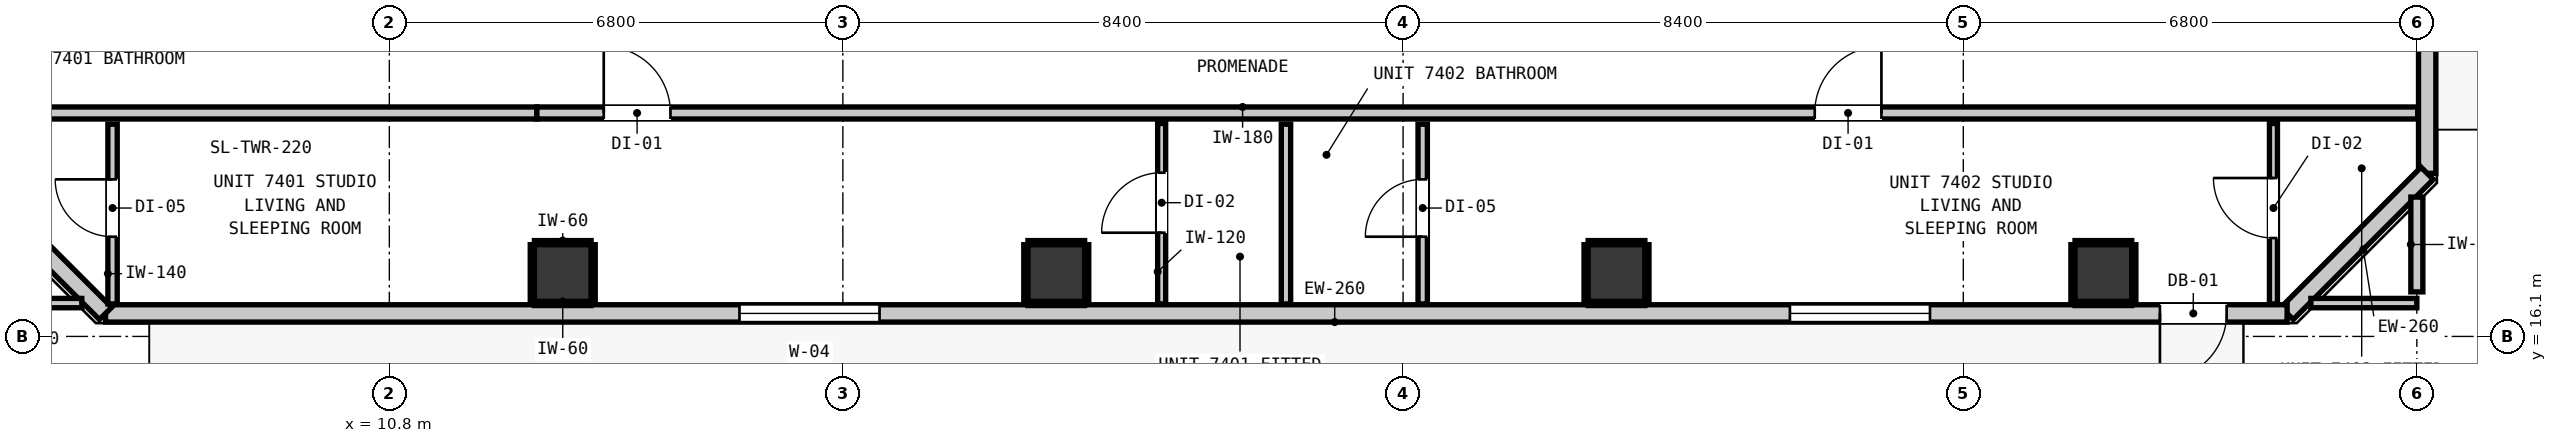
"""IFC4 building model, lengths in metres.
Left out: names, types, materials, properties, quantities, classifications, styles, units other than length and angle.
Written with IfcOpenShell. Run it as: python <this file> out.ifc"""

import sys

from ifc_helpers import new_model, si_unit, direction, frame, frame_2d, origin, origin_2d, place, context, subcontext, project, spatial, rectangle, extrude, element, fill, save


model = new_model("IFC4")
c1 = context("Model", 3, precision=1e-05, world=origin(), true_north=direction((0.0, 1.0)))
c2 = subcontext(c1, "Body", "Model", "MODEL_VIEW")
j1 = project(units=[si_unit("LENGTHUNIT", "METRE"), si_unit("PLANEANGLEUNIT", "RADIAN")], contexts=[c1])
p1 = place(None, origin())
s1 = spatial("IfcSite", under=j1, at=p1, CompositionType="ELEMENT")
p2 = place(p1, origin())
s2 = spatial("IfcBuilding", under=s1, at=p2, CompositionType="ELEMENT")
p3 = place(p2, frame((0.0, 0.0, 254.52)))
s3 = spatial("IfcBuildingStorey", under=s2, at=p3, CompositionType="ELEMENT", Elevation=254.52)
for number, where, z_axis, x_axis in (
    (1, (13.4, 17.05, 0.0), (0.0, 0.0, 1.0), (1.0, 0.0, 0.0)),
    (2, (20.8, 17.05, 0.0), (0.0, 0.0, 1.0), (1.0, 0.0, 0.0)),
    (3, (29.2, 17.05, 0.0), (0.0, 0.0, 1.0), (1.0, 0.0, 0.0)),
    (4, (36.5, 17.05, 0.0), (0.0, 0.0, 1.0), (1.0, 0.0, 0.0)),
):
    element("IfcColumn", number, at=place(p3, frame(where, z_axis=z_axis, x_axis=x_axis)), inside=s3, PredefinedType="COLUMN", context=c2, shape_type="SweptSolid", body=[
        extrude(rectangle(XDim=0.85, YDim=0.85, at=origin_2d()), origin(), (0.0, 0.0, 1.0), 3.32),
    ])
p4 = place(p3, frame((41.355, 48.855, 0.0), z_axis=(0.0, 0.0, 1.0), x_axis=(0.0, -1.0, 0.0)))
e5 = element("IfcWall", 5, at=p4, inside=s3, PredefinedType="STANDARD", context=c2, shape_type="SweptSolid", body=[
    extrude(rectangle(XDim=30.31, YDim=0.26, at=frame_2d((15.155, 0.0))), origin(), (0.0, 0.0, 1.0), 2.96),
])
p5 = place(p4, frame((0.91, 0.0, 0.0)))
e6 = element("IfcOpeningElement", 6, at=p5, cuts=e5, PredefinedType="OPENING", context=c2, shape_type="SweptSolid", body=[
    extrude(rectangle(XDim=1.0, YDim=2.15, at=frame_2d((0.5, 1.075))), frame((0.0, 0.14, 0.0), z_axis=(0.0, -1.0, 0.0), x_axis=(1.0, 0.0, 0.0)), (0.0, 0.0, 1.0), 0.28),
])
p6 = place(p4, frame((3.407, 0.0, 0.85)))
e7 = element("IfcOpeningElement", 7, at=p6, cuts=e5, PredefinedType="OPENING", context=c2, shape_type="SweptSolid", body=[
    extrude(rectangle(XDim=2.1, YDim=1.9, at=frame_2d((1.05, 0.95))), frame((0.0, 0.14, 0.0), z_axis=(0.0, -1.0, 0.0), x_axis=(1.0, 0.0, 0.0)), (0.0, 0.0, 1.0), 0.28),
])
p7 = place(p3, frame((41.355, 18.545, 0.0), z_axis=(0.0, 0.0, 1.0), x_axis=(-0.707147883682, -0.707065676302, 0.0)))
e8 = element("IfcWall", 8, at=p7, inside=s3, PredefinedType="STANDARD", context=c2, shape_type="SweptSolid", body=[
    extrude(rectangle(XDim=2.97, YDim=0.26, at=frame_2d((1.485, 0.0))), origin(), (0.0, 0.0, 1.0), 2.96),
])
p8 = place(p3, frame((39.255, 16.445, 0.0), z_axis=(0.0, 0.0, 1.0), x_axis=(-1.0, 0.0, 0.0)))
e9 = element("IfcWall", 9, at=p8, inside=s3, PredefinedType="STANDARD", context=c2, shape_type="SweptSolid", body=[
    extrude(rectangle(XDim=32.71, YDim=0.26, at=frame_2d((16.355, 0.0))), origin(), (0.0, 0.0, 1.0), 2.96),
])
p9 = place(p8, frame((0.907, 0.0, 0.0)))
e10 = element("IfcOpeningElement", 10, at=p9, cuts=e9, PredefinedType="OPENING", context=c2, shape_type="SweptSolid", body=[
    extrude(rectangle(XDim=1.0, YDim=2.15, at=frame_2d((0.5, 1.075))), frame((0.0, 0.14, 0.0), z_axis=(0.0, -1.0, 0.0), x_axis=(1.0, 0.0, 0.0)), (0.0, 0.0, 1.0), 0.28),
])
p10 = place(p8, frame((21.105, 0.0, 0.85)))
e11 = element("IfcOpeningElement", 11, at=p10, cuts=e9, PredefinedType="OPENING", context=c2, shape_type="SweptSolid", body=[
    extrude(rectangle(XDim=2.1, YDim=1.9, at=frame_2d((1.05, 0.95))), frame((0.0, 0.14, 0.0), z_axis=(0.0, -1.0, 0.0), x_axis=(1.0, 0.0, 0.0)), (0.0, 0.0, 1.0), 0.28),
])
p11 = place(p8, frame((5.355, 0.0, 0.85)))
e12 = element("IfcOpeningElement", 12, at=p11, cuts=e9, PredefinedType="OPENING", context=c2, shape_type="SweptSolid", body=[
    extrude(rectangle(XDim=2.1, YDim=1.9, at=frame_2d((1.05, 0.95))), frame((0.0, 0.14, 0.0), z_axis=(0.0, -1.0, 0.0), x_axis=(1.0, 0.0, 0.0)), (0.0, 0.0, 1.0), 0.28),
])
p12 = place(p3, frame((6.545, 16.445, 0.0), z_axis=(0.0, 0.0, 1.0), x_axis=(-0.707106781187, 0.707106781187, 0.0)))
e13 = element("IfcWall", 13, at=p12, inside=s3, PredefinedType="STANDARD", context=c2, shape_type="SweptSolid", body=[
    extrude(rectangle(XDim=2.97, YDim=0.26, at=frame_2d((1.485, 0.0))), origin(), (0.0, 0.0, 1.0), 2.96),
])
p13 = place(p3, frame((5.388, 19.45, 0.0), z_axis=(0.0, 0.0, 1.0), x_axis=(1.0, 0.0, 0.0)))
e14 = element("IfcWall", 14, at=p13, inside=s3, PredefinedType="PARTITIONING", context=c2, shape_type="SweptSolid", body=[
    extrude(rectangle(XDim=7.624, YDim=0.18, at=frame_2d((3.812, 0.0))), origin(), (0.0, 0.0, 1.0), 2.337),
])
p14 = place(p3, frame((13.012, 19.45, 0.0), z_axis=(0.0, 0.0, 1.0), x_axis=(1.0, 0.0, 0.0)))
e15 = element("IfcWall", 15, at=p14, inside=s3, PredefinedType="PARTITIONING", context=c2, shape_type="SweptSolid", body=[
    extrude(rectangle(XDim=28.201, YDim=0.18, at=frame_2d((14.101, 0.0))), origin(), (0.0, 0.0, 1.0), 2.96),
])
p15 = place(p14, frame((1.003, 0.0, 0.0)))
e16 = element("IfcOpeningElement", 16, at=p15, cuts=e15, PredefinedType="OPENING", context=c2, shape_type="SweptSolid", body=[
    extrude(rectangle(XDim=1.0, YDim=2.15, at=frame_2d((0.5, 1.075))), frame((0.0, 0.1, 0.0), z_axis=(0.0, -1.0, 0.0), x_axis=(1.0, 0.0, 0.0)), (0.0, 0.0, 1.0), 0.2),
])
p16 = place(p14, frame((19.16, 0.0, 0.0)))
e17 = element("IfcOpeningElement", 17, at=p16, cuts=e15, PredefinedType="OPENING", context=c2, shape_type="SweptSolid", body=[
    extrude(rectangle(XDim=1.0, YDim=2.15, at=frame_2d((0.5, 1.075))), frame((0.0, 0.1, 0.0), z_axis=(0.0, -1.0, 0.0), x_axis=(1.0, 0.0, 0.0)), (0.0, 0.0, 1.0), 0.2),
])
for number, where, z_axis, x_axis in (
    (18, (4.6, 16.6, 0.0), (0.0, 0.0, 1.0), (1.0, 0.0, 0.0)),
    (19, (39.611, 16.6, 0.0), (0.0, 0.0, 1.0), (1.0, 0.0, 0.0)),
):
    element("IfcWall", number, at=place(p3, frame(where, z_axis=z_axis, x_axis=x_axis)), inside=s3, PredefinedType="PARTITIONING", context=c2, shape_type="SweptSolid", body=[
        extrude(rectangle(XDim=1.589, YDim=0.14, at=frame_2d((0.794, 0.0))), origin(), (0.0, 0.0, 1.0), 2.96),
    ])
p17 = place(p3, frame((41.2, 16.768, 0.0), z_axis=(0.0, 0.0, 1.0), x_axis=(0.0, 1.0, 0.0)))
e20 = element("IfcWall", 20, at=p17, inside=s3, PredefinedType="PARTITIONING", context=c2, shape_type="SweptSolid", body=[
    extrude(rectangle(XDim=1.421, YDim=0.18, at=frame_2d((0.71, 0.0))), origin(), (0.0, 0.0, 1.0), 2.96),
])
p18 = place(p3, frame((6.65, 16.587, 0.0), z_axis=(0.0, 0.0, 1.0), x_axis=(0.0, 1.0, 0.0)))
e21 = element("IfcWall", 21, at=p18, inside=s3, PredefinedType="PARTITIONING", context=c2, shape_type="SweptSolid", body=[
    extrude(rectangle(XDim=2.695, YDim=0.14, at=frame_2d((1.348, 0.0))), origin(), (0.0, 0.0, 1.0), 2.96),
])
p19 = place(p18, frame((1.008, 0.0, 0.0)))
e22 = element("IfcOpeningElement", 22, at=p19, cuts=e21, PredefinedType="OPENING", context=c2, shape_type="SweptSolid", body=[
    extrude(rectangle(XDim=0.86, YDim=2.02, at=frame_2d((0.43, 1.01))), frame((0.0, 0.08, 0.0), z_axis=(0.0, -1.0, 0.0), x_axis=(1.0, 0.0, 0.0)), (0.0, 0.0, 1.0), 0.16),
])
p20 = place(p3, frame((24.244, 16.587, 0.0), z_axis=(0.0, 0.0, 1.0), x_axis=(0.0, 1.0, 0.0)))
e23 = element("IfcWall", 23, at=p20, inside=s3, PredefinedType="PARTITIONING", context=c2, shape_type="SweptSolid", body=[
    extrude(rectangle(XDim=2.695, YDim=0.14, at=frame_2d((1.348, 0.0))), origin(), (0.0, 0.0, 1.0), 2.96),
])
p21 = place(p3, frame((26.294, 16.587, 0.0), z_axis=(0.0, 0.0, 1.0), x_axis=(0.0, 1.0, 0.0)))
e24 = element("IfcWall", 24, at=p21, inside=s3, PredefinedType="PARTITIONING", context=c2, shape_type="SweptSolid", body=[
    extrude(rectangle(XDim=2.695, YDim=0.14, at=frame_2d((1.348, 0.0))), origin(), (0.0, 0.0, 1.0), 2.96),
])
p22 = place(p21, frame((1.008, 0.0, 0.0)))
e25 = element("IfcOpeningElement", 25, at=p22, cuts=e24, PredefinedType="OPENING", context=c2, shape_type="SweptSolid", body=[
    extrude(rectangle(XDim=0.86, YDim=2.02, at=frame_2d((0.43, 1.01))), frame((0.0, 0.08, 0.0), z_axis=(0.0, -1.0, 0.0), x_axis=(1.0, 0.0, 0.0)), (0.0, 0.0, 1.0), 0.16),
])
p23 = place(p3, frame((22.38, 16.587, 0.0), z_axis=(0.0, 0.0, 1.0), x_axis=(0.0, 1.0, 0.0)))
e26 = element("IfcWall", 26, at=p23, inside=s3, PredefinedType="PARTITIONING", context=c2, shape_type="SweptSolid", body=[
    extrude(rectangle(XDim=2.705, YDim=0.12, at=frame_2d((1.353, 0.0))), origin(), (0.0, 0.0, 1.0), 2.96),
])
p24 = place(p23, frame((1.068, 0.0, 0.0)))
e27 = element("IfcOpeningElement", 27, at=p24, cuts=e26, PredefinedType="OPENING", context=c2, shape_type="SweptSolid", body=[
    extrude(rectangle(XDim=0.9, YDim=2.1, at=frame_2d((0.45, 1.05))), frame((0.0, 0.07, 0.0), z_axis=(0.0, -1.0, 0.0), x_axis=(1.0, 0.0, 0.0)), (0.0, 0.0, 1.0), 0.14),
])
p25 = place(p3, frame((39.05, 16.587, 0.0), z_axis=(0.0, 0.0, 1.0), x_axis=(0.0, 1.0, 0.0)))
e28 = element("IfcWall", 28, at=p25, inside=s3, PredefinedType="PARTITIONING", context=c2, shape_type="SweptSolid", body=[
    extrude(rectangle(XDim=2.705, YDim=0.12, at=frame_2d((1.353, 0.0))), origin(), (0.0, 0.0, 1.0), 2.96),
])
p26 = place(p25, frame((0.988, 0.0, 0.0)))
e29 = element("IfcOpeningElement", 29, at=p26, cuts=e28, PredefinedType="OPENING", context=c2, shape_type="SweptSolid", body=[
    extrude(rectangle(XDim=0.9, YDim=2.1, at=frame_2d((0.45, 1.05))), frame((0.0, 0.07, 0.0), z_axis=(0.0, -1.0, 0.0), x_axis=(1.0, 0.0, 0.0)), (0.0, 0.0, 1.0), 0.14),
])
for number, where, z_axis, x_axis in (
    (30, (12.975, 16.593, 0.0), (0.0, 0.0, 1.0), (1.0, 0.0, 0.0)),
    (31, (12.975, 17.507, 0.0), (0.0, 0.0, 1.0), (1.0, 0.0, 0.0)),
):
    element("IfcWall", number, at=place(p3, frame(where, z_axis=z_axis, x_axis=x_axis)), inside=s3, PredefinedType="PARTITIONING", context=c2, shape_type="SweptSolid", body=[
        extrude(rectangle(XDim=0.85, YDim=0.06, at=frame_2d((0.425, 0.0))), origin(), (0.0, 0.0, 1.0), 1.45),
    ])
for number, where, z_axis, x_axis in (
    (32, (12.943, 16.625, 0.0), (0.0, 0.0, 1.0), (0.0, 1.0, 0.0)),
    (33, (13.857, 16.625, 0.0), (0.0, 0.0, 1.0), (0.0, 1.0, 0.0)),
    (34, (20.375, 16.593, 0.0), (0.0, 0.0, 1.0), (1.0, 0.0, 0.0)),
    (35, (20.375, 17.507, 0.0), (0.0, 0.0, 1.0), (1.0, 0.0, 0.0)),
    (36, (20.343, 16.625, 0.0), (0.0, 0.0, 1.0), (0.0, 1.0, 0.0)),
    (37, (21.257, 16.625, 0.0), (0.0, 0.0, 1.0), (0.0, 1.0, 0.0)),
    (38, (28.775, 16.593, 0.0), (0.0, 0.0, 1.0), (1.0, 0.0, 0.0)),
    (39, (28.775, 17.507, 0.0), (0.0, 0.0, 1.0), (1.0, 0.0, 0.0)),
    (40, (28.743, 16.625, 0.0), (0.0, 0.0, 1.0), (0.0, 1.0, 0.0)),
    (41, (29.657, 16.625, 0.0), (0.0, 0.0, 1.0), (0.0, 1.0, 0.0)),
    (42, (36.075, 16.593, 0.0), (0.0, 0.0, 1.0), (1.0, 0.0, 0.0)),
    (43, (36.075, 17.507, 0.0), (0.0, 0.0, 1.0), (1.0, 0.0, 0.0)),
    (44, (36.043, 16.625, 0.0), (0.0, 0.0, 1.0), (0.0, 1.0, 0.0)),
    (45, (36.957, 16.625, 0.0), (0.0, 0.0, 1.0), (0.0, 1.0, 0.0)),
):
    element("IfcWall", number, at=place(p3, frame(where, z_axis=z_axis, x_axis=x_axis)), inside=s3, PredefinedType="PARTITIONING", context=c2, shape_type="SweptSolid", body=[
        extrude(rectangle(XDim=0.85, YDim=0.06, at=frame_2d((0.425, 0.0))), origin(), (0.0, 0.0, 1.0), 1.45),
    ])
p27 = place(p9, origin())
e46 = element("IfcDoor", 46, at=p27, inside=s3, OperationType="SINGLE_SWING_RIGHT", PredefinedType="DOOR", context=c2, shape_type="SweptSolid", body=[
    extrude(rectangle(XDim=1.0, YDim=2.15, at=frame_2d((0.5, 1.075))), frame((0.0, 0.025, 0.0), z_axis=(0.0, -1.0, 0.0), x_axis=(1.0, 0.0, 0.0)), (0.0, 0.0, 1.0), 0.05),
])
fill(e10, e46)
p28 = place(p10, origin())
e47 = element("IfcWindow", 47, at=p28, inside=s3, PartitioningType="SINGLE_PANEL", PredefinedType="WINDOW", context=c2, shape_type="SweptSolid", body=[
    extrude(rectangle(XDim=2.1, YDim=1.9, at=frame_2d((1.05, 0.95))), frame((0.0, 0.03, 0.0), z_axis=(0.0, -1.0, 0.0), x_axis=(1.0, 0.0, 0.0)), (0.0, 0.0, 1.0), 0.06),
])
fill(e11, e47)
p29 = place(p11, origin())
e48 = element("IfcWindow", 48, at=p29, inside=s3, PartitioningType="SINGLE_PANEL", PredefinedType="WINDOW", context=c2, shape_type="SweptSolid", body=[
    extrude(rectangle(XDim=2.1, YDim=1.9, at=frame_2d((1.05, 0.95))), frame((0.0, 0.03, 0.0), z_axis=(0.0, -1.0, 0.0), x_axis=(1.0, 0.0, 0.0)), (0.0, 0.0, 1.0), 0.06),
])
fill(e12, e48)
p30 = place(p15, origin())
e49 = element("IfcDoor", 49, at=p30, inside=s3, OperationType="SINGLE_SWING_LEFT", PredefinedType="DOOR", context=c2, shape_type="SweptSolid", body=[
    extrude(rectangle(XDim=1.0, YDim=2.15, at=frame_2d((0.5, 1.075))), frame((0.0, 0.025, 0.0), z_axis=(0.0, -1.0, 0.0), x_axis=(1.0, 0.0, 0.0)), (0.0, 0.0, 1.0), 0.05),
])
fill(e16, e49)
p31 = place(p19, origin())
e50 = element("IfcDoor", 50, at=p31, inside=s3, OperationType="SINGLE_SWING_RIGHT", PredefinedType="DOOR", context=c2, shape_type="SweptSolid", body=[
    extrude(rectangle(XDim=0.86, YDim=2.02, at=frame_2d((0.43, 1.01))), frame((0.0, 0.025, 0.0), z_axis=(0.0, -1.0, 0.0), x_axis=(1.0, 0.0, 0.0)), (0.0, 0.0, 1.0), 0.05),
])
fill(e22, e50)
p32 = place(p24, origin())
e51 = element("IfcDoor", 51, at=p32, inside=s3, OperationType="SINGLE_SWING_LEFT", PredefinedType="DOOR", context=c2, shape_type="SweptSolid", body=[
    extrude(rectangle(XDim=0.9, YDim=2.1, at=frame_2d((0.45, 1.05))), frame((0.0, 0.025, 0.0), z_axis=(0.0, -1.0, 0.0), x_axis=(1.0, 0.0, 0.0)), (0.0, 0.0, 1.0), 0.05),
])
fill(e27, e51)
p33 = place(p16, origin())
e52 = element("IfcDoor", 52, at=p33, inside=s3, OperationType="SINGLE_SWING_RIGHT", PredefinedType="DOOR", context=c2, shape_type="SweptSolid", body=[
    extrude(rectangle(XDim=1.0, YDim=2.15, at=frame_2d((0.5, 1.075))), frame((0.0, 0.025, 0.0), z_axis=(0.0, -1.0, 0.0), x_axis=(1.0, 0.0, 0.0)), (0.0, 0.0, 1.0), 0.05),
])
fill(e17, e52)
p34 = place(p22, origin())
e53 = element("IfcDoor", 53, at=p34, inside=s3, OperationType="SINGLE_SWING_LEFT", PredefinedType="DOOR", context=c2, shape_type="SweptSolid", body=[
    extrude(rectangle(XDim=0.86, YDim=2.02, at=frame_2d((0.43, 1.01))), frame((0.0, 0.025, 0.0), z_axis=(0.0, -1.0, 0.0), x_axis=(1.0, 0.0, 0.0)), (0.0, 0.0, 1.0), 0.05),
])
fill(e25, e53)
p35 = place(p26, origin())
e54 = element("IfcDoor", 54, at=p35, inside=s3, OperationType="SINGLE_SWING_RIGHT", PredefinedType="DOOR", context=c2, shape_type="SweptSolid", body=[
    extrude(rectangle(XDim=0.9, YDim=2.1, at=frame_2d((0.45, 1.05))), frame((0.0, 0.025, 0.0), z_axis=(0.0, -1.0, 0.0), x_axis=(1.0, 0.0, 0.0)), (0.0, 0.0, 1.0), 0.05),
])
fill(e29, e54)
save(model, sys.argv[1])
